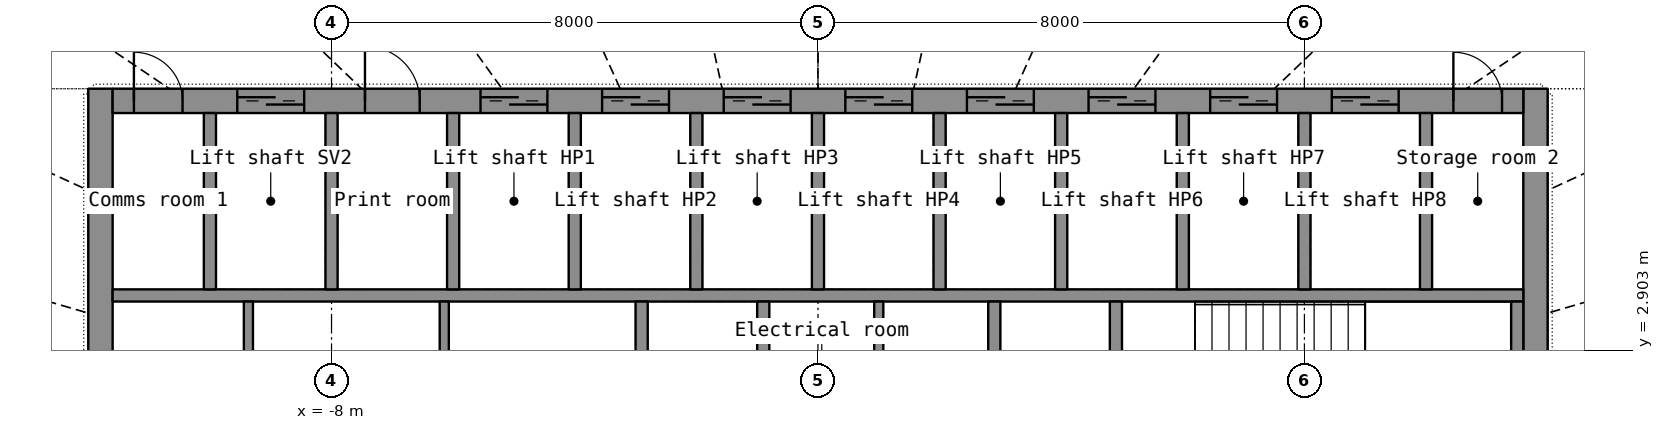
"""IFC4 building model, lengths in metres.
Left out: names, types, materials, properties, quantities, classifications, styles, units other than length and angle.
Written with IfcOpenShell. Run it as: python <this file> out.ifc"""

import sys

from ifc_helpers import new_model, si_unit, direction, frame, frame_2d, origin, place, context, subcontext, project, spatial, rectangle, extrude, element, fill, save


model = new_model("IFC4")
c1 = context("Model", 3, precision=1e-05, world=origin(), true_north=direction((0.0, 1.0)))
c2 = subcontext(c1, "Body", "Model", "MODEL_VIEW")
j1 = project(units=[si_unit("LENGTHUNIT", "METRE"), si_unit("PLANEANGLEUNIT", "RADIAN")], contexts=[c1])
p1 = place(None, origin())
s1 = spatial("IfcSite", under=j1, at=p1, CompositionType="ELEMENT")
p2 = place(p1, origin())
s2 = spatial("IfcBuilding", under=s1, at=p2, CompositionType="ELEMENT")
p3 = place(p2, frame((0.0, 0.0, 254.1)))
s3 = spatial("IfcBuildingStorey", under=s2, at=p3, CompositionType="ELEMENT", Elevation=254.1)
p4 = place(p3, frame((-11.8, -7.2, 0.0), z_axis=(0.0, 0.0, 1.0), x_axis=(0.0, 1.0, 0.0)))
e1 = element("IfcWall", 1, at=p4, inside=s3, PredefinedType="SHEAR", context=c2, shape_type="SweptSolid", body=[
    extrude(rectangle(XDim=14.4, YDim=0.4, at=frame_2d((7.2, 0.0))), origin(), (0.0, 0.0, 1.0), 3.3),
])
p5 = place(p4, frame((6.5, 0.0, 0.0)))
e2 = element("IfcOpeningElement", 2, at=p5, cuts=e1, PredefinedType="OPENING", context=c2, shape_type="SweptSolid", body=[
    extrude(rectangle(XDim=1.4, YDim=2.2, at=frame_2d((0.7, 1.1))), frame((0.0, 0.21, 0.0), z_axis=(0.0, -1.0, 0.0), x_axis=(1.0, 0.0, 0.0)), (0.0, 0.0, 1.0), 0.42),
])
p6 = place(p3, frame((11.8, -7.2, 0.0), z_axis=(0.0, 0.0, 1.0), x_axis=(0.0, 1.0, 0.0)))
e3 = element("IfcWall", 3, at=p6, inside=s3, PredefinedType="SHEAR", context=c2, shape_type="SweptSolid", body=[
    extrude(rectangle(XDim=14.4, YDim=0.4, at=frame_2d((7.2, 0.0))), origin(), (0.0, 0.0, 1.0), 3.3),
])
p7 = place(p6, frame((6.5, 0.0, 0.0)))
e4 = element("IfcOpeningElement", 4, at=p7, cuts=e3, PredefinedType="OPENING", context=c2, shape_type="SweptSolid", body=[
    extrude(rectangle(XDim=1.4, YDim=2.2, at=frame_2d((0.7, 1.1))), frame((0.0, 0.21, 0.0), z_axis=(0.0, -1.0, 0.0), x_axis=(1.0, 0.0, 0.0)), (0.0, 0.0, 1.0), 0.42),
])
p8 = place(p3, frame((-11.6, 7.0, 0.0), z_axis=(0.0, 0.0, 1.0), x_axis=(1.0, 0.0, 0.0)))
e5 = element("IfcWall", 5, at=p8, inside=s3, PredefinedType="SHEAR", context=c2, shape_type="SweptSolid", body=[
    extrude(rectangle(XDim=23.2, YDim=0.4, at=frame_2d((11.6, 0.0))), origin(), (0.0, 0.0, 1.0), 3.3),
])
p9 = place(p8, frame((2.05, 0.0, 0.0)))
e6 = element("IfcOpeningElement", 6, at=p9, cuts=e5, PredefinedType="OPENING", context=c2, shape_type="SweptSolid", body=[
    extrude(rectangle(XDim=1.1, YDim=2.2, at=frame_2d((0.55, 1.1))), frame((0.0, 0.21, 0.0), z_axis=(0.0, -1.0, 0.0), x_axis=(1.0, 0.0, 0.0)), (0.0, 0.0, 1.0), 0.42),
])
p10 = place(p8, frame((6.05, 0.0, 0.0)))
e7 = element("IfcOpeningElement", 7, at=p10, cuts=e5, PredefinedType="OPENING", context=c2, shape_type="SweptSolid", body=[
    extrude(rectangle(XDim=1.1, YDim=2.2, at=frame_2d((0.55, 1.1))), frame((0.0, 0.21, 0.0), z_axis=(0.0, -1.0, 0.0), x_axis=(1.0, 0.0, 0.0)), (0.0, 0.0, 1.0), 0.42),
])
p11 = place(p8, frame((8.05, 0.0, 0.0)))
e8 = element("IfcOpeningElement", 8, at=p11, cuts=e5, PredefinedType="OPENING", context=c2, shape_type="SweptSolid", body=[
    extrude(rectangle(XDim=1.1, YDim=2.2, at=frame_2d((0.55, 1.1))), frame((0.0, 0.21, 0.0), z_axis=(0.0, -1.0, 0.0), x_axis=(1.0, 0.0, 0.0)), (0.0, 0.0, 1.0), 0.42),
])
p12 = place(p8, frame((10.05, 0.0, 0.0)))
e9 = element("IfcOpeningElement", 9, at=p12, cuts=e5, PredefinedType="OPENING", context=c2, shape_type="SweptSolid", body=[
    extrude(rectangle(XDim=1.1, YDim=2.2, at=frame_2d((0.55, 1.1))), frame((0.0, 0.21, 0.0), z_axis=(0.0, -1.0, 0.0), x_axis=(1.0, 0.0, 0.0)), (0.0, 0.0, 1.0), 0.42),
])
p13 = place(p8, frame((12.05, 0.0, 0.0)))
e10 = element("IfcOpeningElement", 10, at=p13, cuts=e5, PredefinedType="OPENING", context=c2, shape_type="SweptSolid", body=[
    extrude(rectangle(XDim=1.1, YDim=2.2, at=frame_2d((0.55, 1.1))), frame((0.0, 0.21, 0.0), z_axis=(0.0, -1.0, 0.0), x_axis=(1.0, 0.0, 0.0)), (0.0, 0.0, 1.0), 0.42),
])
p14 = place(p8, frame((14.05, 0.0, 0.0)))
e11 = element("IfcOpeningElement", 11, at=p14, cuts=e5, PredefinedType="OPENING", context=c2, shape_type="SweptSolid", body=[
    extrude(rectangle(XDim=1.1, YDim=2.2, at=frame_2d((0.55, 1.1))), frame((0.0, 0.21, 0.0), z_axis=(0.0, -1.0, 0.0), x_axis=(1.0, 0.0, 0.0)), (0.0, 0.0, 1.0), 0.42),
])
p15 = place(p8, frame((16.05, 0.0, 0.0)))
e12 = element("IfcOpeningElement", 12, at=p15, cuts=e5, PredefinedType="OPENING", context=c2, shape_type="SweptSolid", body=[
    extrude(rectangle(XDim=1.1, YDim=2.2, at=frame_2d((0.55, 1.1))), frame((0.0, 0.21, 0.0), z_axis=(0.0, -1.0, 0.0), x_axis=(1.0, 0.0, 0.0)), (0.0, 0.0, 1.0), 0.42),
])
p16 = place(p8, frame((18.05, 0.0, 0.0)))
e13 = element("IfcOpeningElement", 13, at=p16, cuts=e5, PredefinedType="OPENING", context=c2, shape_type="SweptSolid", body=[
    extrude(rectangle(XDim=1.1, YDim=2.2, at=frame_2d((0.55, 1.1))), frame((0.0, 0.21, 0.0), z_axis=(0.0, -1.0, 0.0), x_axis=(1.0, 0.0, 0.0)), (0.0, 0.0, 1.0), 0.42),
])
p17 = place(p8, frame((20.05, 0.0, 0.0)))
e14 = element("IfcOpeningElement", 14, at=p17, cuts=e5, PredefinedType="OPENING", context=c2, shape_type="SweptSolid", body=[
    extrude(rectangle(XDim=1.1, YDim=2.2, at=frame_2d((0.55, 1.1))), frame((0.0, 0.21, 0.0), z_axis=(0.0, -1.0, 0.0), x_axis=(1.0, 0.0, 0.0)), (0.0, 0.0, 1.0), 0.42),
])
p18 = place(p8, frame((4.15, 0.0, 0.0)))
e15 = element("IfcOpeningElement", 15, at=p18, cuts=e5, PredefinedType="OPENING", context=c2, shape_type="SweptSolid", body=[
    extrude(rectangle(XDim=0.9, YDim=2.1, at=frame_2d((0.45, 1.05))), frame((0.0, 0.21, 0.0), z_axis=(0.0, -1.0, 0.0), x_axis=(1.0, 0.0, 0.0)), (0.0, 0.0, 1.0), 0.42),
])
p19 = place(p8, frame((0.35, 0.0, 0.0)))
e16 = element("IfcOpeningElement", 16, at=p19, cuts=e5, PredefinedType="OPENING", context=c2, shape_type="SweptSolid", body=[
    extrude(rectangle(XDim=0.8, YDim=2.05, at=frame_2d((0.4, 1.025))), frame((0.0, 0.21, 0.0), z_axis=(0.0, -1.0, 0.0), x_axis=(1.0, 0.0, 0.0)), (0.0, 0.0, 1.0), 0.42),
])
p20 = place(p8, frame((22.05, 0.0, 0.0)))
e17 = element("IfcOpeningElement", 17, at=p20, cuts=e5, PredefinedType="OPENING", context=c2, shape_type="SweptSolid", body=[
    extrude(rectangle(XDim=0.8, YDim=2.05, at=frame_2d((0.4, 1.025))), frame((0.0, 0.21, 0.0), z_axis=(0.0, -1.0, 0.0), x_axis=(1.0, 0.0, 0.0)), (0.0, 0.0, 1.0), 0.42),
])
p21 = place(p3, frame((-11.6, 3.8, 0.0), z_axis=(0.0, 0.0, 1.0), x_axis=(1.0, 0.0, 0.0)))
e18 = element("IfcWall", 18, at=p21, inside=s3, PredefinedType="SHEAR", context=c2, shape_type="SweptSolid", body=[
    extrude(rectangle(XDim=23.2, YDim=0.2, at=frame_2d((11.6, 0.0))), origin(), (0.0, 0.0, 1.0), 3.3),
])
for number, where, z_axis, x_axis in (
    (19, (-10.0, 3.9, 0.0), (0.0, 0.0, 1.0), (0.0, 1.0, 0.0)),
    (20, (-8.0, 3.9, 0.0), (0.0, 0.0, 1.0), (0.0, 1.0, 0.0)),
    (21, (-6.0, 3.9, 0.0), (0.0, 0.0, 1.0), (0.0, 1.0, 0.0)),
    (22, (-4.0, 3.9, 0.0), (0.0, 0.0, 1.0), (0.0, 1.0, 0.0)),
    (23, (-2.0, 3.9, 0.0), (0.0, 0.0, 1.0), (0.0, 1.0, 0.0)),
    (24, (0.0, 3.9, 0.0), (0.0, 0.0, 1.0), (0.0, 1.0, 0.0)),
    (25, (2.0, 3.9, 0.0), (0.0, 0.0, 1.0), (0.0, 1.0, 0.0)),
    (26, (4.0, 3.9, 0.0), (0.0, 0.0, 1.0), (0.0, 1.0, 0.0)),
    (27, (6.0, 3.9, 0.0), (0.0, 0.0, 1.0), (0.0, 1.0, 0.0)),
    (28, (8.0, 3.9, 0.0), (0.0, 0.0, 1.0), (0.0, 1.0, 0.0)),
    (29, (10.0, 3.9, 0.0), (0.0, 0.0, 1.0), (0.0, 1.0, 0.0)),
):
    element("IfcWall", number, at=place(p3, frame(where, z_axis=z_axis, x_axis=x_axis)), inside=s3, PredefinedType="SHEAR", context=c2, shape_type="SweptSolid", body=[
        extrude(rectangle(XDim=2.9, YDim=0.2, at=frame_2d((1.45, 0.0))), origin(), (0.0, 0.0, 1.0), 3.3),
    ])
p22 = place(p3, frame((-2.9, -3.7, 0.0), z_axis=(0.0, 0.0, 1.0), x_axis=(0.0, 1.0, 0.0)))
e30 = element("IfcWall", 30, at=p22, inside=s3, PredefinedType="SHEAR", context=c2, shape_type="SweptSolid", body=[
    extrude(rectangle(XDim=7.4, YDim=0.2, at=frame_2d((3.7, 0.0))), origin(), (0.0, 0.0, 1.0), 3.3),
])
p23 = place(p22, frame((3.1, 0.0, 0.0)))
e31 = element("IfcOpeningElement", 31, at=p23, cuts=e30, PredefinedType="OPENING", context=c2, shape_type="SweptSolid", body=[
    extrude(rectangle(XDim=1.2, YDim=2.2, at=frame_2d((0.6, 1.1))), frame((0.0, 0.11, 0.0), z_axis=(0.0, -1.0, 0.0), x_axis=(1.0, 0.0, 0.0)), (0.0, 0.0, 1.0), 0.22),
])
p24 = place(p3, frame((2.9, -3.7, 0.0), z_axis=(0.0, 0.0, 1.0), x_axis=(0.0, 1.0, 0.0)))
e32 = element("IfcWall", 32, at=p24, inside=s3, PredefinedType="SHEAR", context=c2, shape_type="SweptSolid", body=[
    extrude(rectangle(XDim=7.4, YDim=0.2, at=frame_2d((3.7, 0.0))), origin(), (0.0, 0.0, 1.0), 3.3),
])
p25 = place(p24, frame((3.1, 0.0, 0.0)))
e33 = element("IfcOpeningElement", 33, at=p25, cuts=e32, PredefinedType="OPENING", context=c2, shape_type="SweptSolid", body=[
    extrude(rectangle(XDim=1.2, YDim=2.2, at=frame_2d((0.6, 1.1))), frame((0.0, 0.11, 0.0), z_axis=(0.0, -1.0, 0.0), x_axis=(1.0, 0.0, 0.0)), (0.0, 0.0, 1.0), 0.22),
])
for number, where, z_axis, x_axis in (
    (34, (-0.9, 1.35, 0.0), (0.0, 0.0, 1.0), (0.0, 1.0, 0.0)),
    (35, (11.5, 1.35, 0.0), (0.0, 0.0, 1.0), (0.0, 1.0, 0.0)),
    (36, (4.9, 1.35, 0.0), (0.0, 0.0, 1.0), (0.0, 1.0, 0.0)),
):
    element("IfcWall", number, at=place(p3, frame(where, z_axis=z_axis, x_axis=x_axis)), inside=s3, PredefinedType="SHEAR", context=c2, shape_type="SweptSolid", body=[
        extrude(rectangle(XDim=2.35, YDim=0.2, at=frame_2d((1.175, 0.0))), origin(), (0.0, 0.0, 1.0), 3.3),
    ])
for number, where, z_axis, x_axis in (
    (37, (-9.367, 1.35, 0.0), (0.0, 0.0, 1.0), (0.0, 1.0, 0.0)),
    (38, (-6.146, 1.35, 0.0), (0.0, 0.0, 1.0), (0.0, 1.0, 0.0)),
    (39, (1.0, 1.35, 0.0), (0.0, 0.0, 1.0), (0.0, 1.0, 0.0)),
):
    element("IfcWall", number, at=place(p3, frame(where, z_axis=z_axis, x_axis=x_axis)), inside=s3, PredefinedType="PARTITIONING", context=c2, shape_type="SweptSolid", body=[
        extrude(rectangle(XDim=2.35, YDim=0.15, at=frame_2d((1.175, 0.0))), origin(), (0.0, 0.0, 1.0), 3.3),
    ])
p26 = place(p9, origin())
e40 = element("IfcDoor", 40, at=p26, inside=s3, OperationType="DOUBLE_DOOR_SLIDING", PredefinedType="DOOR", context=c2, shape_type="SweptSolid", body=[
    extrude(rectangle(XDim=1.1, YDim=2.2, at=frame_2d((0.55, 1.1))), frame((0.0, 0.025, 0.0), z_axis=(0.0, -1.0, 0.0), x_axis=(1.0, 0.0, 0.0)), (0.0, 0.0, 1.0), 0.05),
])
fill(e6, e40)
p27 = place(p10, origin())
e41 = element("IfcDoor", 41, at=p27, inside=s3, OperationType="DOUBLE_DOOR_SLIDING", PredefinedType="DOOR", context=c2, shape_type="SweptSolid", body=[
    extrude(rectangle(XDim=1.1, YDim=2.2, at=frame_2d((0.55, 1.1))), frame((0.0, 0.025, 0.0), z_axis=(0.0, -1.0, 0.0), x_axis=(1.0, 0.0, 0.0)), (0.0, 0.0, 1.0), 0.05),
])
fill(e7, e41)
p28 = place(p11, origin())
e42 = element("IfcDoor", 42, at=p28, inside=s3, OperationType="DOUBLE_DOOR_SLIDING", PredefinedType="DOOR", context=c2, shape_type="SweptSolid", body=[
    extrude(rectangle(XDim=1.1, YDim=2.2, at=frame_2d((0.55, 1.1))), frame((0.0, 0.025, 0.0), z_axis=(0.0, -1.0, 0.0), x_axis=(1.0, 0.0, 0.0)), (0.0, 0.0, 1.0), 0.05),
])
fill(e8, e42)
p29 = place(p12, origin())
e43 = element("IfcDoor", 43, at=p29, inside=s3, OperationType="DOUBLE_DOOR_SLIDING", PredefinedType="DOOR", context=c2, shape_type="SweptSolid", body=[
    extrude(rectangle(XDim=1.1, YDim=2.2, at=frame_2d((0.55, 1.1))), frame((0.0, 0.025, 0.0), z_axis=(0.0, -1.0, 0.0), x_axis=(1.0, 0.0, 0.0)), (0.0, 0.0, 1.0), 0.05),
])
fill(e9, e43)
p30 = place(p13, origin())
e44 = element("IfcDoor", 44, at=p30, inside=s3, OperationType="DOUBLE_DOOR_SLIDING", PredefinedType="DOOR", context=c2, shape_type="SweptSolid", body=[
    extrude(rectangle(XDim=1.1, YDim=2.2, at=frame_2d((0.55, 1.1))), frame((0.0, 0.025, 0.0), z_axis=(0.0, -1.0, 0.0), x_axis=(1.0, 0.0, 0.0)), (0.0, 0.0, 1.0), 0.05),
])
fill(e10, e44)
p31 = place(p14, origin())
e45 = element("IfcDoor", 45, at=p31, inside=s3, OperationType="DOUBLE_DOOR_SLIDING", PredefinedType="DOOR", context=c2, shape_type="SweptSolid", body=[
    extrude(rectangle(XDim=1.1, YDim=2.2, at=frame_2d((0.55, 1.1))), frame((0.0, 0.025, 0.0), z_axis=(0.0, -1.0, 0.0), x_axis=(1.0, 0.0, 0.0)), (0.0, 0.0, 1.0), 0.05),
])
fill(e11, e45)
p32 = place(p15, origin())
e46 = element("IfcDoor", 46, at=p32, inside=s3, OperationType="DOUBLE_DOOR_SLIDING", PredefinedType="DOOR", context=c2, shape_type="SweptSolid", body=[
    extrude(rectangle(XDim=1.1, YDim=2.2, at=frame_2d((0.55, 1.1))), frame((0.0, 0.025, 0.0), z_axis=(0.0, -1.0, 0.0), x_axis=(1.0, 0.0, 0.0)), (0.0, 0.0, 1.0), 0.05),
])
fill(e12, e46)
p33 = place(p16, origin())
e47 = element("IfcDoor", 47, at=p33, inside=s3, OperationType="DOUBLE_DOOR_SLIDING", PredefinedType="DOOR", context=c2, shape_type="SweptSolid", body=[
    extrude(rectangle(XDim=1.1, YDim=2.2, at=frame_2d((0.55, 1.1))), frame((0.0, 0.025, 0.0), z_axis=(0.0, -1.0, 0.0), x_axis=(1.0, 0.0, 0.0)), (0.0, 0.0, 1.0), 0.05),
])
fill(e13, e47)
p34 = place(p17, origin())
e48 = element("IfcDoor", 48, at=p34, inside=s3, OperationType="DOUBLE_DOOR_SLIDING", PredefinedType="DOOR", context=c2, shape_type="SweptSolid", body=[
    extrude(rectangle(XDim=1.1, YDim=2.2, at=frame_2d((0.55, 1.1))), frame((0.0, 0.025, 0.0), z_axis=(0.0, -1.0, 0.0), x_axis=(1.0, 0.0, 0.0)), (0.0, 0.0, 1.0), 0.05),
])
fill(e14, e48)
p35 = place(p18, origin())
e49 = element("IfcDoor", 49, at=p35, inside=s3, OperationType="SINGLE_SWING_LEFT", PredefinedType="DOOR", context=c2, shape_type="SweptSolid", body=[
    extrude(rectangle(XDim=0.9, YDim=2.1, at=frame_2d((0.45, 1.05))), frame((0.0, 0.025, 0.0), z_axis=(0.0, -1.0, 0.0), x_axis=(1.0, 0.0, 0.0)), (0.0, 0.0, 1.0), 0.05),
])
fill(e15, e49)
p36 = place(p19, origin())
e50 = element("IfcDoor", 50, at=p36, inside=s3, OperationType="SINGLE_SWING_LEFT", PredefinedType="DOOR", context=c2, shape_type="SweptSolid", body=[
    extrude(rectangle(XDim=0.8, YDim=2.05, at=frame_2d((0.4, 1.025))), frame((0.0, 0.025, 0.0), z_axis=(0.0, -1.0, 0.0), x_axis=(1.0, 0.0, 0.0)), (0.0, 0.0, 1.0), 0.05),
])
fill(e16, e50)
p37 = place(p20, origin())
e51 = element("IfcDoor", 51, at=p37, inside=s3, OperationType="SINGLE_SWING_LEFT", PredefinedType="DOOR", context=c2, shape_type="SweptSolid", body=[
    extrude(rectangle(XDim=0.8, YDim=2.05, at=frame_2d((0.4, 1.025))), frame((0.0, 0.025, 0.0), z_axis=(0.0, -1.0, 0.0), x_axis=(1.0, 0.0, 0.0)), (0.0, 0.0, 1.0), 0.05),
])
fill(e17, e51)
save(model, sys.argv[1])
